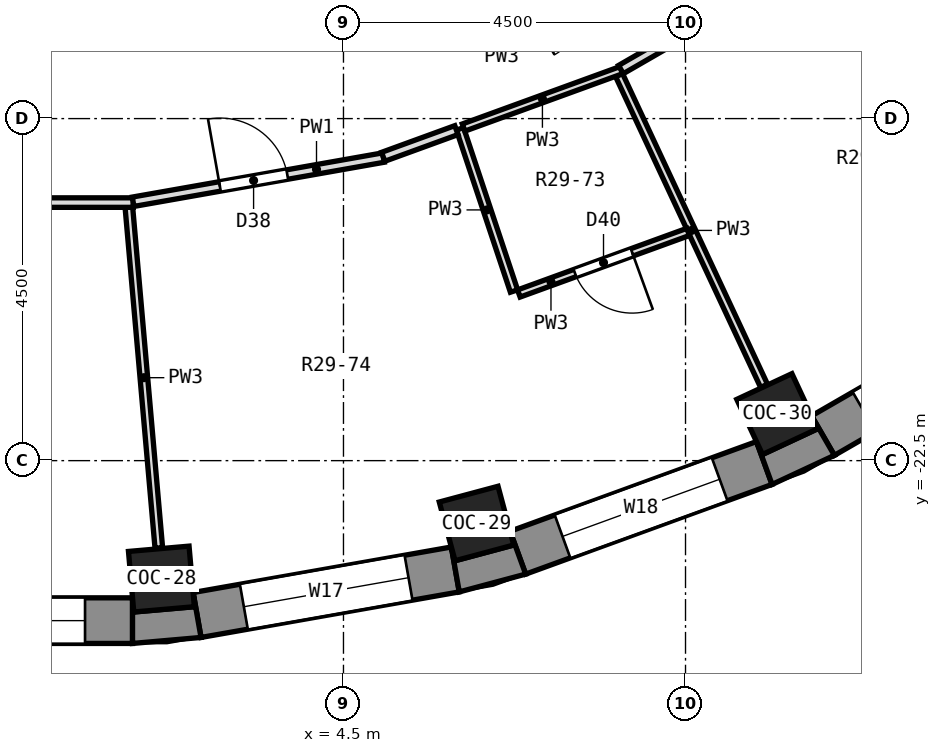
"""IFC4 building model, lengths in metres.
Left out: names, types, materials, properties, quantities, classifications, styles, units other than length and angle.
Written with IfcOpenShell. Run it as: python <this file> out.ifc"""

import sys

from ifc_helpers import new_model, si_unit, direction, frame, frame_2d, origin, origin_2d, place, context, subcontext, project, spatial, polyline, rectangle, outline, extrude, element, fill, save


model = new_model("IFC4")
c1 = context("Model", 3, precision=1e-05, world=origin(), true_north=direction((0.0, 1.0)))
c2 = subcontext(c1, "Body", "Model", "MODEL_VIEW")
j1 = project(units=[si_unit("LENGTHUNIT", "METRE"), si_unit("PLANEANGLEUNIT", "RADIAN")], contexts=[c1])
p1 = place(None, origin())
s1 = spatial("IfcSite", under=j1, at=p1, CompositionType="ELEMENT")
p2 = place(p1, origin())
s2 = spatial("IfcBuilding", under=s1, at=p2, CompositionType="ELEMENT")
p3 = place(p2, frame((0.0, 0.0, 200.4)))
s3 = spatial("IfcBuildingStorey", under=s2, at=p3, CompositionType="ELEMENT", Elevation=200.4)
for number, where, z_axis, x_axis in (
    (1, (2.105, -24.058, 0.0), (0.0, 0.0, 1.0), (0.087, -0.996, 0.0)),
    (2, (6.25, -23.327, 0.0), (0.0, 0.0, 1.0), (0.259, -0.966, 0.0)),
    (3, (10.206, -21.887, 0.0), (0.0, 0.0, 1.0), (0.423, -0.906, 0.0)),
):
    element("IfcColumn", number, at=place(p3, frame(where, z_axis=z_axis, x_axis=x_axis)), inside=s3, PredefinedType="COLUMN", context=c2, shape_type="SweptSolid", body=[
        extrude(rectangle(XDim=0.8, YDim=0.8, at=origin_2d()), origin(), (0.0, 0.0, 1.0), 3.3),
    ])
p4 = place(p3, frame((-1.725, -24.605, 0.0), z_axis=(0.0, 0.0, 1.0), x_axis=(1.0, 0.0, 0.0)))
e4 = element("IfcWall", 4, at=p4, inside=s3, PredefinedType="SOLIDWALL", context=c2, shape_type="SweptSolid", body=[
    extrude(rectangle(XDim=3.45, YDim=0.6, at=frame_2d((1.725, 0.0))), origin(), (0.0, 0.0, 1.0), 2.85),
])
p5 = place(p4, frame((0.625, 0.0, 0.9)))
e5 = element("IfcOpeningElement", 5, at=p5, cuts=e4, PredefinedType="OPENING", context=c2, shape_type="SweptSolid", body=[
    extrude(rectangle(XDim=2.2, YDim=1.8, at=frame_2d((1.1, 0.9))), frame((0.0, 0.312, 0.0), z_axis=(0.0, -1.0, 0.0), x_axis=(1.0, 0.0, 0.0)), (0.0, 0.0, 1.0), 0.624),
])
p6 = place(p3, frame((2.574, -24.531, 0.0), z_axis=(0.0, 0.0, 1.0), x_axis=(0.984814892183, 0.173607684551, 0.0)))
e6 = element("IfcWall", 6, at=p6, inside=s3, PredefinedType="SOLIDWALL", context=c2, shape_type="SweptSolid", body=[
    extrude(rectangle(XDim=3.45, YDim=0.6, at=frame_2d((1.725, 0.0))), origin(), (0.0, 0.0, 1.0), 2.85),
])
p7 = place(p6, frame((0.625, 0.0, 0.9)))
e7 = element("IfcOpeningElement", 7, at=p7, cuts=e6, PredefinedType="OPENING", context=c2, shape_type="SweptSolid", body=[
    extrude(rectangle(XDim=2.2, YDim=1.8, at=frame_2d((1.1, 0.9))), frame((0.0, 0.312, 0.0), z_axis=(0.0, -1.0, 0.0), x_axis=(1.0, 0.0, 0.0)), (0.0, 0.0, 1.0), 0.624),
])
p8 = place(p3, frame((6.794, -23.711, 0.0), z_axis=(0.0, 0.0, 1.0), x_axis=(0.93968799822, 0.342032843455, 0.0)))
e8 = element("IfcWall", 8, at=p8, inside=s3, PredefinedType="SOLIDWALL", context=c2, shape_type="SweptSolid", body=[
    extrude(rectangle(XDim=3.45, YDim=0.6, at=frame_2d((1.725, 0.0))), origin(), (0.0, 0.0, 1.0), 2.85),
])
p9 = place(p8, frame((0.625, 0.0, 0.9)))
e9 = element("IfcOpeningElement", 9, at=p9, cuts=e8, PredefinedType="OPENING", context=c2, shape_type="SweptSolid", body=[
    extrude(rectangle(XDim=2.2, YDim=1.8, at=frame_2d((1.1, 0.9))), frame((0.0, 0.312, 0.0), z_axis=(0.0, -1.0, 0.0), x_axis=(1.0, 0.0, 0.0)), (0.0, 0.0, 1.0), 0.624),
])
p10 = place(p3, frame((10.809, -22.171, 0.0), z_axis=(0.0, 0.0, 1.0), x_axis=(0.86602648383, 0.499998129301, 0.0)))
e10 = element("IfcWall", 10, at=p10, inside=s3, PredefinedType="SOLIDWALL", context=c2, shape_type="SweptSolid", body=[
    extrude(rectangle(XDim=3.45, YDim=0.6, at=frame_2d((1.725, 0.0))), origin(), (0.0, 0.0, 1.0), 2.85),
])
p11 = place(p10, frame((0.625, 0.0, 0.9)))
e11 = element("IfcOpeningElement", 11, at=p11, cuts=e10, PredefinedType="OPENING", context=c2, shape_type="SweptSolid", body=[
    extrude(rectangle(XDim=2.2, YDim=1.8, at=frame_2d((1.1, 0.9))), frame((0.0, 0.312, 0.0), z_axis=(0.0, -1.0, 0.0), x_axis=(1.0, 0.0, 0.0)), (0.0, 0.0, 1.0), 0.624),
])
p12 = place(p3, origin())
e12 = element("IfcWall", 12, at=p12, inside=s3, PredefinedType="SOLIDWALL", context=c2, shape_type="SweptSolid", body=[
    extrude(outline(polyline([(1.725, -24.905), (2.626, -24.826), (2.522, -24.235), (2.538, -24.422), (1.741, -24.491), (1.725, -24.305), (1.725, -24.905)])), origin(), (0.0, 0.0, 1.0), 2.85),
])
p13 = place(p3, origin())
e13 = element("IfcWall", 13, at=p13, inside=s3, PredefinedType="SOLIDWALL", context=c2, shape_type="SweptSolid", body=[
    extrude(outline(polyline([(6.023, -24.227), (6.897, -23.993), (6.692, -23.429), (6.74, -23.61), (5.968, -23.817), (5.919, -23.636), (6.023, -24.227)])), origin(), (0.0, 0.0, 1.0), 2.85),
])
p14 = place(p3, origin())
e14 = element("IfcWall", 14, at=p14, inside=s3, PredefinedType="SOLIDWALL", context=c2, shape_type="SweptSolid", body=[
    extrude(outline(polyline([(10.959, -22.431), (10.659, -21.911), (10.738, -22.081), (10.013, -22.419), (9.934, -22.249), (10.139, -22.813), (10.959, -22.431)])), origin(), (0.0, 0.0, 1.0), 2.85),
])
p15 = place(p3, frame((1.677, -19.167, 0.0), z_axis=(0.0, 0.0, 1.0), x_axis=(0.087521667832, -0.996162616072, 0.0)))
e15 = element("IfcWall", 15, at=p15, inside=s3, PredefinedType="PARTITIONING", context=c2, shape_type="SweptSolid", body=[
    extrude(rectangle(XDim=4.5, YDim=0.1, at=frame_2d((2.25, 0.0))), origin(), (0.0, 0.0, 1.0), 2.85),
])
p16 = place(p3, frame((6.033, -18.135, 0.0), z_axis=(0.0, 0.0, 1.0), x_axis=(0.316032342538, -0.948748416847, 0.0)))
e16 = element("IfcWall", 16, at=p16, inside=s3, PredefinedType="PARTITIONING", context=c2, shape_type="SweptSolid", body=[
    extrude(rectangle(XDim=2.249, YDim=0.1, at=frame_2d((1.125, 0.0))), origin(), (0.0, 0.0, 1.0), 2.85),
])
p17 = place(p3, frame((8.125, -17.427, 0.0), z_axis=(0.0, 0.0, 1.0), x_axis=(0.422852881861, -0.906198344901, 0.0)))
e17 = element("IfcWall", 17, at=p17, inside=s3, PredefinedType="PARTITIONING", context=c2, shape_type="SweptSolid", body=[
    extrude(rectangle(XDim=4.512, YDim=0.1, at=frame_2d((2.256, 0.0))), origin(), (0.0, 0.0, 1.0), 2.85),
])
p18 = place(p3, frame((-1.608, -19.105, 0.0), z_axis=(0.0, 0.0, 1.0), x_axis=(1.0, 0.0, 0.0)))
e18 = element("IfcWall", 18, at=p18, inside=s3, PredefinedType="PARTITIONING", context=c2, shape_type="SweptSolid", body=[
    extrude(rectangle(XDim=3.343, YDim=0.125, at=frame_2d((1.671, 0.0))), origin(), (0.0, 0.0, 1.0), 2.85),
])
p19 = place(p3, frame((1.732, -19.094, 0.0), z_axis=(0.0, 0.0, 1.0), x_axis=(0.984782824009, 0.173789497774, 0.0)))
e19 = element("IfcWall", 19, at=p19, inside=s3, PredefinedType="PARTITIONING", context=c2, shape_type="SweptSolid", body=[
    extrude(rectangle(XDim=3.345, YDim=0.125, at=frame_2d((1.672, 0.0))), origin(), (0.0, 0.0, 1.0), 2.85),
])
p20 = place(p19, frame((1.159, 0.0, 0.0)))
e20 = element("IfcOpeningElement", 20, at=p20, cuts=e19, PredefinedType="OPENING", context=c2, shape_type="SweptSolid", body=[
    extrude(rectangle(XDim=0.9, YDim=2.1, at=frame_2d((0.45, 1.05))), frame((0.0, 0.074, 0.0), z_axis=(0.0, -1.0, 0.0), x_axis=(1.0, 0.0, 0.0)), (0.0, 0.0, 1.0), 0.149),
])
p21 = place(p3, frame((6.807, -20.301, 0.0), z_axis=(0.0, 0.0, 1.0), x_axis=(0.939763340539, 0.341825779863, 0.0)))
e21 = element("IfcWall", 21, at=p21, inside=s3, PredefinedType="PARTITIONING", context=c2, shape_type="SweptSolid", body=[
    extrude(rectangle(XDim=2.37, YDim=0.1, at=frame_2d((1.185, 0.0))), origin(), (0.0, 0.0, 1.0), 2.85),
])
p22 = place(p21, frame((0.785, 0.0, 0.0)))
e22 = element("IfcOpeningElement", 22, at=p22, cuts=e21, PredefinedType="OPENING", context=c2, shape_type="SweptSolid", body=[
    extrude(rectangle(XDim=0.8, YDim=2.1, at=frame_2d((0.4, 1.05))), frame((0.0, 0.062, 0.0), z_axis=(0.0, -1.0, 0.0), x_axis=(1.0, 0.0, 0.0)), (0.0, 0.0, 1.0), 0.124),
])
p23 = place(p3, frame((6.08, -18.118, 0.0), z_axis=(0.0, 0.0, 1.0), x_axis=(0.939706230865, 0.341982747625, 0.0)))
e23 = element("IfcWall", 23, at=p23, inside=s3, PredefinedType="PARTITIONING", context=c2, shape_type="SweptSolid", body=[
    extrude(rectangle(XDim=2.208, YDim=0.1, at=frame_2d((1.104, 0.0))), origin(), (0.0, 0.0, 1.0), 2.85),
])
p24 = place(p3, frame((5.023, -18.503, 0.0), z_axis=(0.0, 0.0, 1.0), x_axis=(0.939605522223, 0.34225934992, 0.0)))
e24 = element("IfcWall", 24, at=p24, inside=s3, PredefinedType="PARTITIONING", context=c2, shape_type="SweptSolid", body=[
    extrude(rectangle(XDim=1.025, YDim=0.125, at=frame_2d((0.513, 0.0))), origin(), (0.0, 0.0, 1.0), 2.85),
])
p25 = place(p3, frame((8.15, -17.355, 0.0), z_axis=(0.0, 0.0, 1.0), x_axis=(0.86608012654, 0.499905205426, 0.0)))
e25 = element("IfcWall", 25, at=p25, inside=s3, PredefinedType="PARTITIONING", context=c2, shape_type="SweptSolid", body=[
    extrude(rectangle(XDim=3.354, YDim=0.125, at=frame_2d((1.677, 0.0))), origin(), (0.0, 0.0, 1.0), 2.85),
])
p26 = place(p5, origin())
e26 = element("IfcWindow", 26, at=p26, inside=s3, PartitioningType="SINGLE_PANEL", PredefinedType="WINDOW", context=c2, shape_type="SweptSolid", body=[
    extrude(rectangle(XDim=2.2, YDim=1.8, at=frame_2d((1.1, 0.9))), frame((0.0, 0.18, 0.0), z_axis=(0.0, -1.0, 0.0), x_axis=(1.0, 0.0, 0.0)), (0.0, 0.0, 1.0), 0.06),
])
fill(e5, e26)
p27 = place(p7, origin())
e27 = element("IfcWindow", 27, at=p27, inside=s3, PartitioningType="SINGLE_PANEL", PredefinedType="WINDOW", context=c2, shape_type="SweptSolid", body=[
    extrude(rectangle(XDim=2.2, YDim=1.8, at=frame_2d((1.1, 0.9))), frame((0.0, 0.18, 0.0), z_axis=(0.0, -1.0, 0.0), x_axis=(1.0, 0.0, 0.0)), (0.0, 0.0, 1.0), 0.06),
])
fill(e7, e27)
p28 = place(p9, origin())
e28 = element("IfcWindow", 28, at=p28, inside=s3, PartitioningType="SINGLE_PANEL", PredefinedType="WINDOW", context=c2, shape_type="SweptSolid", body=[
    extrude(rectangle(XDim=2.2, YDim=1.8, at=frame_2d((1.1, 0.9))), frame((0.0, 0.18, 0.0), z_axis=(0.0, -1.0, 0.0), x_axis=(1.0, 0.0, 0.0)), (0.0, 0.0, 1.0), 0.06),
])
fill(e9, e28)
p29 = place(p11, origin())
e29 = element("IfcWindow", 29, at=p29, inside=s3, PartitioningType="SINGLE_PANEL", PredefinedType="WINDOW", context=c2, shape_type="SweptSolid", body=[
    extrude(rectangle(XDim=2.2, YDim=1.8, at=frame_2d((1.1, 0.9))), frame((0.0, 0.18, 0.0), z_axis=(0.0, -1.0, 0.0), x_axis=(1.0, 0.0, 0.0)), (0.0, 0.0, 1.0), 0.06),
])
fill(e11, e29)
p30 = place(p20, origin())
e30 = element("IfcDoor", 30, at=p30, inside=s3, OperationType="SINGLE_SWING_LEFT", PredefinedType="DOOR", context=c2, shape_type="SweptSolid", body=[
    extrude(rectangle(XDim=0.9, YDim=2.1, at=frame_2d((0.45, 1.05))), frame((0.0, 0.025, 0.0), z_axis=(0.0, -1.0, 0.0), x_axis=(1.0, 0.0, 0.0)), (0.0, 0.0, 1.0), 0.05),
])
fill(e20, e30)
p31 = place(p22, frame((0.8, 0.0, 0.0), z_axis=(0.0, 0.0, 1.0), x_axis=(-1.0, 0.0, 0.0)))
e31 = element("IfcDoor", 31, at=p31, inside=s3, OperationType="SINGLE_SWING_LEFT", PredefinedType="DOOR", context=c2, shape_type="SweptSolid", body=[
    extrude(rectangle(XDim=0.8, YDim=2.1, at=frame_2d((0.4, 1.05))), frame((0.0, 0.025, 0.0), z_axis=(0.0, -1.0, 0.0), x_axis=(1.0, 0.0, 0.0)), (0.0, 0.0, 1.0), 0.05),
])
fill(e22, e31)
save(model, sys.argv[1])
